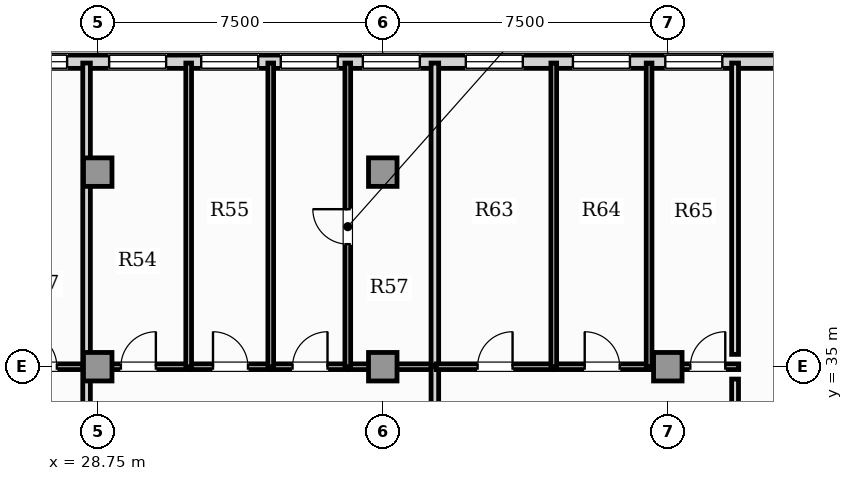
"""IFC4 building model, lengths in metres.
Left out: names, types, materials, properties, quantities, classifications, styles, units other than length and angle.
Written with IfcOpenShell. Run it as: python <this file> out.ifc"""

import sys

from ifc_helpers import new_model, si_unit, direction, frame, frame_2d, origin, origin_2d, place, context, subcontext, project, spatial, rectangle, extrude, element, fill, save


model = new_model("IFC4")
c1 = context("Model", 3, precision=1e-05, world=origin(), true_north=direction((0.0, 1.0)))
c2 = subcontext(c1, "Body", "Model", "MODEL_VIEW")
j1 = project(units=[si_unit("LENGTHUNIT", "METRE"), si_unit("PLANEANGLEUNIT", "RADIAN")], contexts=[c1])
p1 = place(None, origin())
s1 = spatial("IfcSite", under=j1, at=p1, CompositionType="ELEMENT")
p2 = place(p1, origin())
s2 = spatial("IfcBuilding", under=s1, at=p2, CompositionType="ELEMENT")
p3 = place(p2, frame((0.0, 0.0, 119.55)))
s3 = spatial("IfcBuildingStorey", under=s2, at=p3, CompositionType="ELEMENT", Elevation=119.55)
for number, where, z_axis, x_axis in (
    (1, (28.75, 40.12, 0.0), (0.0, 0.0, 1.0), (1.0, 0.0, 0.0)),
    (2, (36.25, 40.12, 0.0), (0.0, 0.0, 1.0), (1.0, 0.0, 0.0)),
    (3, (28.75, 35.0, 0.0), (0.0, 0.0, 1.0), (1.0, 0.0, 0.0)),
    (4, (36.25, 35.0, 0.0), (0.0, 0.0, 1.0), (1.0, 0.0, 0.0)),
    (5, (43.75, 35.0, 0.0), (0.0, 0.0, 1.0), (1.0, 0.0, 0.0)),
):
    element("IfcColumn", number, at=place(p3, frame(where, z_axis=z_axis, x_axis=x_axis)), inside=s3, PredefinedType="COLUMN", context=c2, shape_type="SweptSolid", body=[
        extrude(rectangle(XDim=0.75, YDim=0.75, at=origin_2d()), origin(), (0.0, 0.0, 1.0), 3.85),
    ])
p4 = place(p3, frame((51.66, 43.025, 0.0), z_axis=(0.0, 0.0, 1.0), x_axis=(-1.0, 0.0, 0.0)))
e6 = element("IfcWall", 6, at=p4, inside=s3, PredefinedType="SOLIDWALL", context=c2, shape_type="SweptSolid", body=[
    extrude(rectangle(XDim=45.82, YDim=0.35, at=frame_2d((22.91, 0.0))), origin(), (0.0, 0.0, 1.0), 3.6),
])
p5 = place(p4, frame((42.468, 0.0, 0.9)))
e7 = element("IfcOpeningElement", 7, at=p5, cuts=e6, PredefinedType="OPENING", context=c2, shape_type="SweptSolid", body=[
    extrude(rectangle(XDim=1.5, YDim=1.95, at=frame_2d((0.75, 0.975))), frame((0.0, 0.185, 0.0), z_axis=(0.0, -1.0, 0.0), x_axis=(1.0, 0.0, 0.0)), (0.0, 0.0, 1.0), 0.37),
])
p6 = place(p4, frame((1.853, 0.0, 0.9)))
e8 = element("IfcOpeningElement", 8, at=p6, cuts=e6, PredefinedType="OPENING", context=c2, shape_type="SweptSolid", body=[
    extrude(rectangle(XDim=1.5, YDim=1.95, at=frame_2d((0.75, 0.975))), frame((0.0, 0.185, 0.0), z_axis=(0.0, -1.0, 0.0), x_axis=(1.0, 0.0, 0.0)), (0.0, 0.0, 1.0), 0.37),
])
p7 = place(p4, frame((37.994, 0.0, 0.9)))
e9 = element("IfcOpeningElement", 9, at=p7, cuts=e6, PredefinedType="OPENING", context=c2, shape_type="SweptSolid", body=[
    extrude(rectangle(XDim=0.9, YDim=1.4, at=frame_2d((0.45, 0.7))), frame((0.0, 0.185, 0.0), z_axis=(0.0, -1.0, 0.0), x_axis=(1.0, 0.0, 0.0)), (0.0, 0.0, 1.0), 0.37),
])
p8 = place(p4, frame((34.938, 0.0, 0.95)))
e10 = element("IfcOpeningElement", 10, at=p8, cuts=e6, PredefinedType="OPENING", context=c2, shape_type="SweptSolid", body=[
    extrude(rectangle(XDim=0.9, YDim=1.5, at=frame_2d((0.45, 0.75))), frame((0.0, 0.185, 0.0), z_axis=(0.0, -1.0, 0.0), x_axis=(1.0, 0.0, 0.0)), (0.0, 0.0, 1.0), 0.37),
])
p9 = place(p4, frame((32.207, 0.0, 0.9)))
e11 = element("IfcOpeningElement", 11, at=p9, cuts=e6, PredefinedType="OPENING", context=c2, shape_type="SweptSolid", body=[
    extrude(rectangle(XDim=1.5, YDim=1.95, at=frame_2d((0.75, 0.975))), frame((0.0, 0.185, 0.0), z_axis=(0.0, -1.0, 0.0), x_axis=(1.0, 0.0, 0.0)), (0.0, 0.0, 1.0), 0.37),
])
p10 = place(p4, frame((29.35, 0.0, 0.9)))
e12 = element("IfcOpeningElement", 12, at=p10, cuts=e6, PredefinedType="OPENING", context=c2, shape_type="SweptSolid", body=[
    extrude(rectangle(XDim=1.5, YDim=1.95, at=frame_2d((0.75, 0.975))), frame((0.0, 0.185, 0.0), z_axis=(0.0, -1.0, 0.0), x_axis=(1.0, 0.0, 0.0)), (0.0, 0.0, 1.0), 0.37),
])
p11 = place(p4, frame((26.324, 0.0, 0.9)))
e13 = element("IfcOpeningElement", 13, at=p11, cuts=e6, PredefinedType="OPENING", context=c2, shape_type="SweptSolid", body=[
    extrude(rectangle(XDim=1.5, YDim=1.95, at=frame_2d((0.75, 0.975))), frame((0.0, 0.185, 0.0), z_axis=(0.0, -1.0, 0.0), x_axis=(1.0, 0.0, 0.0)), (0.0, 0.0, 1.0), 0.37),
])
p12 = place(p4, frame((23.716, 0.0, 0.9)))
e14 = element("IfcOpeningElement", 14, at=p12, cuts=e6, PredefinedType="OPENING", context=c2, shape_type="SweptSolid", body=[
    extrude(rectangle(XDim=1.5, YDim=1.95, at=frame_2d((0.75, 0.975))), frame((0.0, 0.185, 0.0), z_axis=(0.0, -1.0, 0.0), x_axis=(1.0, 0.0, 0.0)), (0.0, 0.0, 1.0), 0.37),
])
p13 = place(p4, frame((21.11, 0.0, 0.9)))
e15 = element("IfcOpeningElement", 15, at=p13, cuts=e6, PredefinedType="OPENING", context=c2, shape_type="SweptSolid", body=[
    extrude(rectangle(XDim=1.5, YDim=1.95, at=frame_2d((0.75, 0.975))), frame((0.0, 0.185, 0.0), z_axis=(0.0, -1.0, 0.0), x_axis=(1.0, 0.0, 0.0)), (0.0, 0.0, 1.0), 0.37),
])
p14 = place(p4, frame((18.687, 0.0, 0.9)))
e16 = element("IfcOpeningElement", 16, at=p14, cuts=e6, PredefinedType="OPENING", context=c2, shape_type="SweptSolid", body=[
    extrude(rectangle(XDim=1.5, YDim=1.95, at=frame_2d((0.75, 0.975))), frame((0.0, 0.185, 0.0), z_axis=(0.0, -1.0, 0.0), x_axis=(1.0, 0.0, 0.0)), (0.0, 0.0, 1.0), 0.37),
])
p15 = place(p4, frame((16.594, 0.0, 0.9)))
e17 = element("IfcOpeningElement", 17, at=p15, cuts=e6, PredefinedType="OPENING", context=c2, shape_type="SweptSolid", body=[
    extrude(rectangle(XDim=1.5, YDim=1.95, at=frame_2d((0.75, 0.975))), frame((0.0, 0.185, 0.0), z_axis=(0.0, -1.0, 0.0), x_axis=(1.0, 0.0, 0.0)), (0.0, 0.0, 1.0), 0.37),
])
p16 = place(p4, frame((14.435, 0.0, 0.9)))
e18 = element("IfcOpeningElement", 18, at=p16, cuts=e6, PredefinedType="OPENING", context=c2, shape_type="SweptSolid", body=[
    extrude(rectangle(XDim=1.5, YDim=1.95, at=frame_2d((0.75, 0.975))), frame((0.0, 0.185, 0.0), z_axis=(0.0, -1.0, 0.0), x_axis=(1.0, 0.0, 0.0)), (0.0, 0.0, 1.0), 0.37),
])
p17 = place(p4, frame((11.725, 0.0, 0.9)))
e19 = element("IfcOpeningElement", 19, at=p17, cuts=e6, PredefinedType="OPENING", context=c2, shape_type="SweptSolid", body=[
    extrude(rectangle(XDim=1.5, YDim=1.95, at=frame_2d((0.75, 0.975))), frame((0.0, 0.185, 0.0), z_axis=(0.0, -1.0, 0.0), x_axis=(1.0, 0.0, 0.0)), (0.0, 0.0, 1.0), 0.37),
])
p18 = place(p4, frame((8.906, 0.0, 0.9)))
e20 = element("IfcOpeningElement", 20, at=p18, cuts=e6, PredefinedType="OPENING", context=c2, shape_type="SweptSolid", body=[
    extrude(rectangle(XDim=1.5, YDim=1.95, at=frame_2d((0.75, 0.975))), frame((0.0, 0.185, 0.0), z_axis=(0.0, -1.0, 0.0), x_axis=(1.0, 0.0, 0.0)), (0.0, 0.0, 1.0), 0.37),
])
p19 = place(p4, frame((6.476, 0.0, 0.9)))
e21 = element("IfcOpeningElement", 21, at=p19, cuts=e6, PredefinedType="OPENING", context=c2, shape_type="SweptSolid", body=[
    extrude(rectangle(XDim=1.5, YDim=1.95, at=frame_2d((0.75, 0.975))), frame((0.0, 0.185, 0.0), z_axis=(0.0, -1.0, 0.0), x_axis=(1.0, 0.0, 0.0)), (0.0, 0.0, 1.0), 0.37),
])
p20 = place(p3, frame((25.967, 35.0, 0.0), z_axis=(0.0, 0.0, 1.0), x_axis=(1.0, 0.0, 0.0)))
e22 = element("IfcWall", 22, at=p20, inside=s3, PredefinedType="PARTITIONING", context=c2, shape_type="SweptSolid", body=[
    extrude(rectangle(XDim=2.494, YDim=0.15, at=frame_2d((1.247, 0.0))), origin(), (0.0, 0.0, 1.0), 2.983),
])
p21 = place(p20, frame((0.787, 0.0, 0.0)))
e23 = element("IfcOpeningElement", 23, at=p21, cuts=e22, PredefinedType="OPENING", context=c2, shape_type="SweptSolid", body=[
    extrude(rectangle(XDim=0.92, YDim=2.1, at=frame_2d((0.46, 1.05))), frame((0.0, 0.085, 0.0), z_axis=(0.0, -1.0, 0.0), x_axis=(1.0, 0.0, 0.0)), (0.0, 0.0, 1.0), 0.17),
])
p22 = place(p3, frame((28.456, 33.495, 0.0), z_axis=(0.0, 0.0, 1.0), x_axis=(0.0, 1.0, 0.0)))
e24 = element("IfcWall", 24, at=p22, inside=s3, PredefinedType="PARTITIONING", context=c2, shape_type="SweptSolid", body=[
    extrude(rectangle(XDim=1.51, YDim=0.2, at=frame_2d((0.755, 0.0))), origin(), (0.0, 0.0, 1.0), 3.6),
])
p23 = place(p3, frame((28.456, 35.035, 0.0), z_axis=(0.0, 0.0, 1.0), x_axis=(0.0, 1.0, 0.0)))
e25 = element("IfcWall", 25, at=p23, inside=s3, PredefinedType="PARTITIONING", context=c2, shape_type="SweptSolid", body=[
    extrude(rectangle(XDim=7.955, YDim=0.2, at=frame_2d((3.978, 0.0))), origin(), (0.0, 0.0, 1.0), 3.6),
])
p24 = place(p3, frame((28.491, 35.0, 0.0), z_axis=(0.0, 0.0, 1.0), x_axis=(1.0, 0.0, 0.0)))
e26 = element("IfcWall", 26, at=p24, inside=s3, PredefinedType="PARTITIONING", context=c2, shape_type="SweptSolid", body=[
    extrude(rectangle(XDim=2.657, YDim=0.15, at=frame_2d((1.329, 0.0))), origin(), (0.0, 0.0, 1.0), 2.983),
])
p25 = place(p24, frame((0.868, 0.0, 0.0)))
e27 = element("IfcOpeningElement", 27, at=p25, cuts=e26, PredefinedType="OPENING", context=c2, shape_type="SweptSolid", body=[
    extrude(rectangle(XDim=0.92, YDim=2.1, at=frame_2d((0.46, 1.05))), frame((0.0, 0.085, 0.0), z_axis=(0.0, -1.0, 0.0), x_axis=(1.0, 0.0, 0.0)), (0.0, 0.0, 1.0), 0.17),
])
p26 = place(p3, frame((31.178, 35.0, 0.0), z_axis=(0.0, 0.0, 1.0), x_axis=(1.0, 0.0, 0.0)))
e28 = element("IfcWall", 28, at=p26, inside=s3, PredefinedType="PARTITIONING", context=c2, shape_type="SweptSolid", body=[
    extrude(rectangle(XDim=2.129, YDim=0.15, at=frame_2d((1.065, 0.0))), origin(), (0.0, 0.0, 1.0), 2.983),
])
p27 = place(p26, frame((0.604, 0.0, 0.0)))
e29 = element("IfcOpeningElement", 29, at=p27, cuts=e28, PredefinedType="OPENING", context=c2, shape_type="SweptSolid", body=[
    extrude(rectangle(XDim=0.92, YDim=2.1, at=frame_2d((0.46, 1.05))), frame((0.0, 0.085, 0.0), z_axis=(0.0, -1.0, 0.0), x_axis=(1.0, 0.0, 0.0)), (0.0, 0.0, 1.0), 0.17),
])
p28 = place(p3, frame((33.337, 35.0, 0.0), z_axis=(0.0, 0.0, 1.0), x_axis=(1.0, 0.0, 0.0)))
e30 = element("IfcWall", 30, at=p28, inside=s3, PredefinedType="PARTITIONING", context=c2, shape_type="SweptSolid", body=[
    extrude(rectangle(XDim=1.997, YDim=0.15, at=frame_2d((0.999, 0.0))), origin(), (0.0, 0.0, 1.0), 2.983),
])
p29 = place(p28, frame((0.539, 0.0, 0.0)))
e31 = element("IfcOpeningElement", 31, at=p29, cuts=e30, PredefinedType="OPENING", context=c2, shape_type="SweptSolid", body=[
    extrude(rectangle(XDim=0.92, YDim=2.1, at=frame_2d((0.46, 1.05))), frame((0.0, 0.085, 0.0), z_axis=(0.0, -1.0, 0.0), x_axis=(1.0, 0.0, 0.0)), (0.0, 0.0, 1.0), 0.17),
])
p30 = place(p3, frame((35.365, 35.0, 0.0), z_axis=(0.0, 0.0, 1.0), x_axis=(1.0, 0.0, 0.0)))
e32 = element("IfcWall", 32, at=p30, inside=s3, PredefinedType="PARTITIONING", context=c2, shape_type="SweptSolid", body=[
    extrude(rectangle(XDim=2.261, YDim=0.15, at=frame_2d((1.131, 0.0))), origin(), (0.0, 0.0, 1.0), 2.983),
])
p31 = place(p3, frame((37.621, 33.495, 0.0), z_axis=(0.0, 0.0, 1.0), x_axis=(0.0, 1.0, 0.0)))
e33 = element("IfcWall", 33, at=p31, inside=s3, PredefinedType="PARTITIONING", context=c2, shape_type="SweptSolid", body=[
    extrude(rectangle(XDim=1.51, YDim=0.2, at=frame_2d((0.755, 0.0))), origin(), (0.0, 0.0, 1.0), 3.6),
])
for number, where, z_axis, x_axis in (
    (34, (31.143, 34.995, 0.0), (0.0, 0.0, 1.0), (0.0, 1.0, 0.0)),
    (35, (33.302, 34.995, 0.0), (0.0, 0.0, 1.0), (0.0, 1.0, 0.0)),
):
    element("IfcWall", number, at=place(p3, frame(where, z_axis=z_axis, x_axis=x_axis)), inside=s3, PredefinedType="PARTITIONING", context=c2, shape_type="SweptSolid", body=[
        extrude(rectangle(XDim=7.995, YDim=0.15, at=frame_2d((3.998, 0.0))), origin(), (0.0, 0.0, 1.0), 3.6),
    ])
p32 = place(p3, frame((35.33, 34.995, 0.0), z_axis=(0.0, 0.0, 1.0), x_axis=(0.0, 1.0, 0.0)))
e36 = element("IfcWall", 36, at=p32, inside=s3, PredefinedType="PARTITIONING", context=c2, shape_type="SweptSolid", body=[
    extrude(rectangle(XDim=7.995, YDim=0.15, at=frame_2d((3.998, 0.0))), origin(), (0.0, 0.0, 1.0), 3.6),
])
p33 = place(p32, frame((3.23, 0.0, 0.0)))
e37 = element("IfcOpeningElement", 37, at=p33, cuts=e36, PredefinedType="OPENING", context=c2, shape_type="SweptSolid", body=[
    extrude(rectangle(XDim=0.92, YDim=2.1, at=frame_2d((0.46, 1.05))), frame((0.0, 0.085, 0.0), z_axis=(0.0, -1.0, 0.0), x_axis=(1.0, 0.0, 0.0)), (0.0, 0.0, 1.0), 0.17),
])
p34 = place(p3, frame((37.621, 35.035, 0.0), z_axis=(0.0, 0.0, 1.0), x_axis=(0.0, 1.0, 0.0)))
e38 = element("IfcWall", 38, at=p34, inside=s3, PredefinedType="PARTITIONING", context=c2, shape_type="SweptSolid", body=[
    extrude(rectangle(XDim=7.955, YDim=0.2, at=frame_2d((3.978, 0.0))), origin(), (0.0, 0.0, 1.0), 3.6),
])
p35 = place(p3, frame((37.656, 35.0, 0.0), z_axis=(0.0, 0.0, 1.0), x_axis=(1.0, 0.0, 0.0)))
e39 = element("IfcWall", 39, at=p35, inside=s3, PredefinedType="PARTITIONING", context=c2, shape_type="SweptSolid", body=[
    extrude(rectangle(XDim=3.099, YDim=0.15, at=frame_2d((1.549, 0.0))), origin(), (0.0, 0.0, 1.0), 2.983),
])
p36 = place(p35, frame((1.089, 0.0, 0.0)))
e40 = element("IfcOpeningElement", 40, at=p36, cuts=e39, PredefinedType="OPENING", context=c2, shape_type="SweptSolid", body=[
    extrude(rectangle(XDim=0.92, YDim=2.1, at=frame_2d((0.46, 1.05))), frame((0.0, 0.085, 0.0), z_axis=(0.0, -1.0, 0.0), x_axis=(1.0, 0.0, 0.0)), (0.0, 0.0, 1.0), 0.17),
])
p37 = place(p3, frame((40.784, 35.0, 0.0), z_axis=(0.0, 0.0, 1.0), x_axis=(1.0, 0.0, 0.0)))
e41 = element("IfcWall", 41, at=p37, inside=s3, PredefinedType="PARTITIONING", context=c2, shape_type="SweptSolid", body=[
    extrude(rectangle(XDim=2.478, YDim=0.15, at=frame_2d((1.239, 0.0))), origin(), (0.0, 0.0, 1.0), 2.983),
])
p38 = place(p37, frame((0.779, 0.0, 0.0)))
e42 = element("IfcOpeningElement", 42, at=p38, cuts=e41, PredefinedType="OPENING", context=c2, shape_type="SweptSolid", body=[
    extrude(rectangle(XDim=0.92, YDim=2.1, at=frame_2d((0.46, 1.05))), frame((0.0, 0.085, 0.0), z_axis=(0.0, -1.0, 0.0), x_axis=(1.0, 0.0, 0.0)), (0.0, 0.0, 1.0), 0.17),
])
p39 = place(p3, frame((43.292, 35.0, 0.0), z_axis=(0.0, 0.0, 1.0), x_axis=(1.0, 0.0, 0.0)))
e43 = element("IfcWall", 43, at=p39, inside=s3, PredefinedType="PARTITIONING", context=c2, shape_type="SweptSolid", body=[
    extrude(rectangle(XDim=2.323, YDim=0.15, at=frame_2d((1.161, 0.0))), origin(), (0.0, 0.0, 1.0), 2.983),
])
p40 = place(p39, frame((1.05, 0.0, 0.0)))
e44 = element("IfcOpeningElement", 44, at=p40, cuts=e43, PredefinedType="OPENING", context=c2, shape_type="SweptSolid", body=[
    extrude(rectangle(XDim=0.92, YDim=2.1, at=frame_2d((0.46, 1.05))), frame((0.0, 0.085, 0.0), z_axis=(0.0, -1.0, 0.0), x_axis=(1.0, 0.0, 0.0)), (0.0, 0.0, 1.0), 0.17),
])
for number, where, z_axis, x_axis in (
    (45, (40.75, 34.995, 0.0), (0.0, 0.0, 1.0), (0.0, 1.0, 0.0)),
    (46, (43.257, 34.995, 0.0), (0.0, 0.0, 1.0), (0.0, 1.0, 0.0)),
):
    element("IfcWall", number, at=place(p3, frame(where, z_axis=z_axis, x_axis=x_axis)), inside=s3, PredefinedType="PARTITIONING", context=c2, shape_type="SweptSolid", body=[
        extrude(rectangle(XDim=7.995, YDim=0.15, at=frame_2d((3.998, 0.0))), origin(), (0.0, 0.0, 1.0), 3.6),
    ])
p41 = place(p3, frame((45.52, 34.675, 0.0), z_axis=(0.0, 0.0, 1.0), x_axis=(0.0, -1.0, 0.0)))
e47 = element("IfcWall", 47, at=p41, inside=s3, PredefinedType="PARTITIONING", context=c2, shape_type="SweptSolid", body=[
    extrude(rectangle(XDim=0.85, YDim=0.18, at=frame_2d((0.425, 0.0))), origin(), (0.0, 0.0, 1.0), 3.6),
])
p42 = place(p3, frame((45.52, 42.99, 0.0), z_axis=(0.0, 0.0, 1.0), x_axis=(0.0, -1.0, 0.0)))
e48 = element("IfcWall", 48, at=p42, inside=s3, PredefinedType="PARTITIONING", context=c2, shape_type="SweptSolid", body=[
    extrude(rectangle(XDim=7.665, YDim=0.18, at=frame_2d((3.833, 0.0))), origin(), (0.0, 0.0, 1.0), 3.6),
])
p43 = place(p12, origin())
e49 = element("IfcWindow", 49, at=p43, inside=s3, PartitioningType="SINGLE_PANEL", PredefinedType="WINDOW", context=c2, shape_type="SweptSolid", body=[
    extrude(rectangle(XDim=1.5, YDim=1.95, at=frame_2d((0.75, 0.975))), frame((0.0, 0.03, 0.0), z_axis=(0.0, -1.0, 0.0), x_axis=(1.0, 0.0, 0.0)), (0.0, 0.0, 1.0), 0.06),
])
fill(e14, e49)
p44 = place(p13, origin())
e50 = element("IfcWindow", 50, at=p44, inside=s3, PartitioningType="SINGLE_PANEL", PredefinedType="WINDOW", context=c2, shape_type="SweptSolid", body=[
    extrude(rectangle(XDim=1.5, YDim=1.95, at=frame_2d((0.75, 0.975))), frame((0.0, 0.03, 0.0), z_axis=(0.0, -1.0, 0.0), x_axis=(1.0, 0.0, 0.0)), (0.0, 0.0, 1.0), 0.06),
])
fill(e15, e50)
p45 = place(p14, origin())
e51 = element("IfcWindow", 51, at=p45, inside=s3, PartitioningType="SINGLE_PANEL", PredefinedType="WINDOW", context=c2, shape_type="SweptSolid", body=[
    extrude(rectangle(XDim=1.5, YDim=1.95, at=frame_2d((0.75, 0.975))), frame((0.0, 0.03, 0.0), z_axis=(0.0, -1.0, 0.0), x_axis=(1.0, 0.0, 0.0)), (0.0, 0.0, 1.0), 0.06),
])
fill(e16, e51)
p46 = place(p15, origin())
e52 = element("IfcWindow", 52, at=p46, inside=s3, PartitioningType="SINGLE_PANEL", PredefinedType="WINDOW", context=c2, shape_type="SweptSolid", body=[
    extrude(rectangle(XDim=1.5, YDim=1.95, at=frame_2d((0.75, 0.975))), frame((0.0, 0.03, 0.0), z_axis=(0.0, -1.0, 0.0), x_axis=(1.0, 0.0, 0.0)), (0.0, 0.0, 1.0), 0.06),
])
fill(e17, e52)
p47 = place(p16, origin())
e53 = element("IfcWindow", 53, at=p47, inside=s3, PartitioningType="SINGLE_PANEL", PredefinedType="WINDOW", context=c2, shape_type="SweptSolid", body=[
    extrude(rectangle(XDim=1.5, YDim=1.95, at=frame_2d((0.75, 0.975))), frame((0.0, 0.03, 0.0), z_axis=(0.0, -1.0, 0.0), x_axis=(1.0, 0.0, 0.0)), (0.0, 0.0, 1.0), 0.06),
])
fill(e18, e53)
p48 = place(p17, origin())
e54 = element("IfcWindow", 54, at=p48, inside=s3, PartitioningType="SINGLE_PANEL", PredefinedType="WINDOW", context=c2, shape_type="SweptSolid", body=[
    extrude(rectangle(XDim=1.5, YDim=1.95, at=frame_2d((0.75, 0.975))), frame((0.0, 0.03, 0.0), z_axis=(0.0, -1.0, 0.0), x_axis=(1.0, 0.0, 0.0)), (0.0, 0.0, 1.0), 0.06),
])
fill(e19, e54)
p49 = place(p18, origin())
e55 = element("IfcWindow", 55, at=p49, inside=s3, PartitioningType="SINGLE_PANEL", PredefinedType="WINDOW", context=c2, shape_type="SweptSolid", body=[
    extrude(rectangle(XDim=1.5, YDim=1.95, at=frame_2d((0.75, 0.975))), frame((0.0, 0.03, 0.0), z_axis=(0.0, -1.0, 0.0), x_axis=(1.0, 0.0, 0.0)), (0.0, 0.0, 1.0), 0.06),
])
fill(e20, e55)
p50 = place(p19, origin())
e56 = element("IfcWindow", 56, at=p50, inside=s3, PartitioningType="SINGLE_PANEL", PredefinedType="WINDOW", context=c2, shape_type="SweptSolid", body=[
    extrude(rectangle(XDim=1.5, YDim=1.95, at=frame_2d((0.75, 0.975))), frame((0.0, 0.03, 0.0), z_axis=(0.0, -1.0, 0.0), x_axis=(1.0, 0.0, 0.0)), (0.0, 0.0, 1.0), 0.06),
])
fill(e21, e56)
p51 = place(p21, origin())
e57 = element("IfcDoor", 57, at=p51, inside=s3, OperationType="SINGLE_SWING_LEFT", PredefinedType="DOOR", context=c2, shape_type="SweptSolid", body=[
    extrude(rectangle(XDim=0.92, YDim=2.1, at=frame_2d((0.46, 1.05))), frame((0.0, 0.025, 0.0), z_axis=(0.0, -1.0, 0.0), x_axis=(1.0, 0.0, 0.0)), (0.0, 0.0, 1.0), 0.05),
])
fill(e23, e57)
p52 = place(p25, origin())
e58 = element("IfcDoor", 58, at=p52, inside=s3, OperationType="SINGLE_SWING_RIGHT", PredefinedType="DOOR", context=c2, shape_type="SweptSolid", body=[
    extrude(rectangle(XDim=0.92, YDim=2.1, at=frame_2d((0.46, 1.05))), frame((0.0, 0.025, 0.0), z_axis=(0.0, -1.0, 0.0), x_axis=(1.0, 0.0, 0.0)), (0.0, 0.0, 1.0), 0.05),
])
fill(e27, e58)
p53 = place(p27, origin())
e59 = element("IfcDoor", 59, at=p53, inside=s3, OperationType="SINGLE_SWING_LEFT", PredefinedType="DOOR", context=c2, shape_type="SweptSolid", body=[
    extrude(rectangle(XDim=0.92, YDim=2.1, at=frame_2d((0.46, 1.05))), frame((0.0, 0.025, 0.0), z_axis=(0.0, -1.0, 0.0), x_axis=(1.0, 0.0, 0.0)), (0.0, 0.0, 1.0), 0.05),
])
fill(e29, e59)
p54 = place(p29, origin())
e60 = element("IfcDoor", 60, at=p54, inside=s3, OperationType="SINGLE_SWING_RIGHT", PredefinedType="DOOR", context=c2, shape_type="SweptSolid", body=[
    extrude(rectangle(XDim=0.92, YDim=2.1, at=frame_2d((0.46, 1.05))), frame((0.0, 0.025, 0.0), z_axis=(0.0, -1.0, 0.0), x_axis=(1.0, 0.0, 0.0)), (0.0, 0.0, 1.0), 0.05),
])
fill(e31, e60)
p55 = place(p36, origin())
e61 = element("IfcDoor", 61, at=p55, inside=s3, OperationType="SINGLE_SWING_RIGHT", PredefinedType="DOOR", context=c2, shape_type="SweptSolid", body=[
    extrude(rectangle(XDim=0.92, YDim=2.1, at=frame_2d((0.46, 1.05))), frame((0.0, 0.025, 0.0), z_axis=(0.0, -1.0, 0.0), x_axis=(1.0, 0.0, 0.0)), (0.0, 0.0, 1.0), 0.05),
])
fill(e40, e61)
p56 = place(p38, origin())
e62 = element("IfcDoor", 62, at=p56, inside=s3, OperationType="SINGLE_SWING_LEFT", PredefinedType="DOOR", context=c2, shape_type="SweptSolid", body=[
    extrude(rectangle(XDim=0.92, YDim=2.1, at=frame_2d((0.46, 1.05))), frame((0.0, 0.025, 0.0), z_axis=(0.0, -1.0, 0.0), x_axis=(1.0, 0.0, 0.0)), (0.0, 0.0, 1.0), 0.05),
])
fill(e42, e62)
p57 = place(p40, origin())
e63 = element("IfcDoor", 63, at=p57, inside=s3, OperationType="SINGLE_SWING_RIGHT", PredefinedType="DOOR", context=c2, shape_type="SweptSolid", body=[
    extrude(rectangle(XDim=0.92, YDim=2.1, at=frame_2d((0.46, 1.05))), frame((0.0, 0.025, 0.0), z_axis=(0.0, -1.0, 0.0), x_axis=(1.0, 0.0, 0.0)), (0.0, 0.0, 1.0), 0.05),
])
fill(e44, e63)
p58 = place(p33, origin())
e64 = element("IfcDoor", 64, at=p58, inside=s3, OperationType="SINGLE_SWING_RIGHT", PredefinedType="DOOR", context=c2, shape_type="SweptSolid", body=[
    extrude(rectangle(XDim=0.92, YDim=2.1, at=frame_2d((0.46, 1.05))), frame((0.0, 0.025, 0.0), z_axis=(0.0, -1.0, 0.0), x_axis=(1.0, 0.0, 0.0)), (0.0, 0.0, 1.0), 0.05),
])
fill(e37, e64)
save(model, sys.argv[1])
